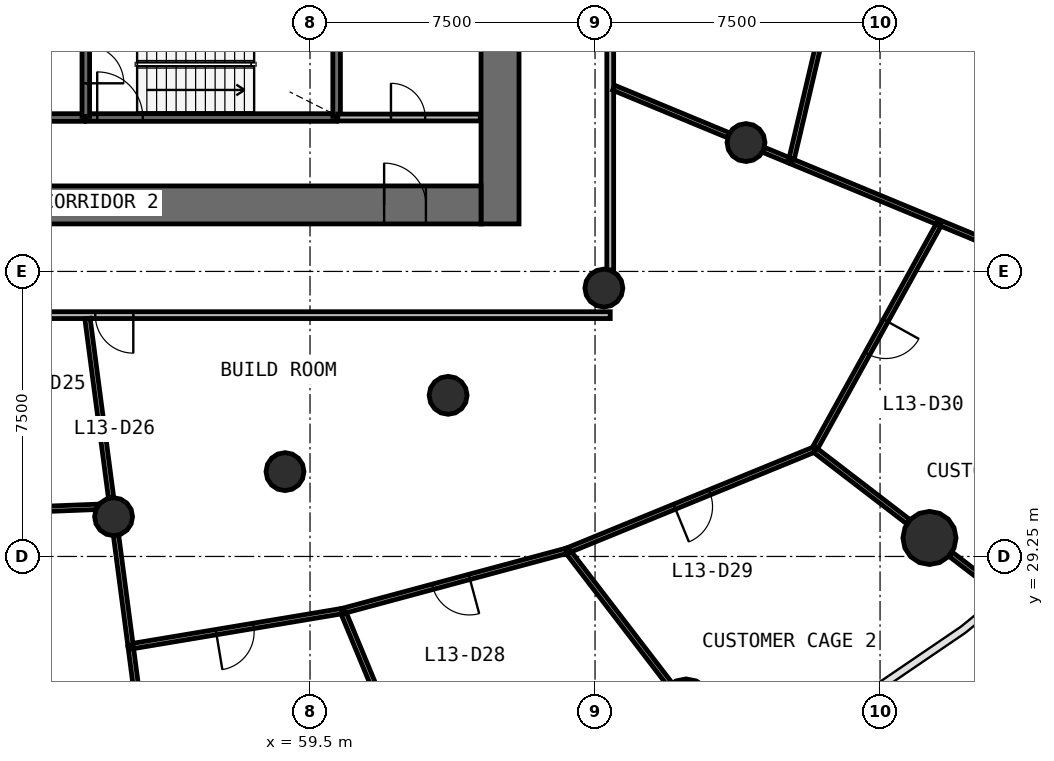
"""IFC4 building model, lengths in metres.
Left out: names, types, materials, properties, quantities, classifications, styles, units other than length and angle.
Written with IfcOpenShell. Run it as: python <this file> out.ifc"""

import sys

from ifc_helpers import new_model, si_unit, direction, frame, frame_2d, origin, origin_2d, place, context, subcontext, project, spatial, rectangle, circle, extrude, source, transform, mapped, element, fill, save


model = new_model("IFC4")
c1 = context("Model", 3, precision=1e-05, world=origin(), true_north=direction((0.0, 1.0)))
c2 = subcontext(c1, "Body", "Model", "MODEL_VIEW")
j1 = project(units=[si_unit("LENGTHUNIT", "METRE"), si_unit("PLANEANGLEUNIT", "RADIAN")], contexts=[c1])
p1 = place(None, origin())
s1 = spatial("IfcSite", under=j1, at=p1, CompositionType="ELEMENT")
p2 = place(p1, origin())
s2 = spatial("IfcBuilding", under=s1, at=p2, CompositionType="ELEMENT")
p3 = place(p2, frame((0.0, 0.0, 57.8)))
s3 = spatial("IfcBuildingStorey", under=s2, at=p3, CompositionType="ELEMENT", Elevation=57.8)
p4 = place(p3, frame((64.5, 38.0, 0.0), z_axis=(0.0, 0.0, 1.0), x_axis=(0.0, 1.0, 0.0)))
e1 = element("IfcWall", 1, at=p4, inside=s3, PredefinedType="SHEAR", context=c2, shape_type="SweptSolid", body=[
    extrude(rectangle(XDim=20.0, YDim=1.0, at=frame_2d((10.0, 0.0))), origin(), (0.0, 0.0, 1.0), 4.4),
])
p5 = place(p4, frame((9.1, 0.0, 0.0)))
e2 = element("IfcOpeningElement", 2, at=p5, cuts=e1, PredefinedType="OPENING", context=c2, shape_type="SweptSolid", body=[
    extrude(rectangle(XDim=1.8, YDim=2.1, at=frame_2d((0.9, 1.05))), frame((0.0, 0.51, 0.0), z_axis=(0.0, -1.0, 0.0), x_axis=(1.0, 0.0, 0.0)), (0.0, 0.0, 1.0), 1.02),
])
p6 = place(p3, frame((40.0, 38.5, 0.0), z_axis=(0.0, 0.0, 1.0), x_axis=(1.0, 0.0, 0.0)))
e3 = element("IfcWall", 3, at=p6, inside=s3, PredefinedType="SHEAR", context=c2, shape_type="SweptSolid", body=[
    extrude(rectangle(XDim=24.0, YDim=1.0, at=frame_2d((12.0, 0.0))), origin(), (0.0, 0.0, 1.0), 4.4),
])
p7 = place(p6, frame((21.45, 0.0, 0.0)))
e4 = element("IfcOpeningElement", 4, at=p7, cuts=e3, PredefinedType="OPENING", context=c2, shape_type="SweptSolid", body=[
    extrude(rectangle(XDim=1.1, YDim=2.1, at=frame_2d((0.55, 1.05))), frame((0.0, 0.51, 0.0), z_axis=(0.0, -1.0, 0.0), x_axis=(1.0, 0.0, 0.0)), (0.0, 0.0, 1.0), 1.02),
])
p8 = place(p6, frame((1.95, 0.0, 0.0)))
e5 = element("IfcOpeningElement", 5, at=p8, cuts=e3, PredefinedType="OPENING", context=c2, shape_type="SweptSolid", body=[
    extrude(rectangle(XDim=1.1, YDim=2.1, at=frame_2d((0.55, 1.05))), frame((0.0, 0.51, 0.0), z_axis=(0.0, -1.0, 0.0), x_axis=(1.0, 0.0, 0.0)), (0.0, 0.0, 1.0), 1.02),
])
m1 = source(origin(), c2, "Body", "SweptSolid", [
    extrude(circle(Radius=0.7, at=origin_2d()), origin(), (0.0, 0.0, 1.0), 4.4),
])
for number, where, z_axis, x_axis in (
    (6, (69.396, 25.328, 0.0), (0.0, 0.0, 1.0), (1.0, 0.0, 0.0)),
    (7, (75.801, 29.737, 0.0), (0.0, 0.0, 1.0), (1.0, 0.0, 0.0)),
):
    element("IfcColumn", number, at=place(p3, frame(where, z_axis=z_axis, x_axis=x_axis)), inside=s3, PredefinedType="COLUMN", context=c2, shape_type="MappedRepresentation", body=[
        mapped(m1, transform((0.0, 0.0, 0.0), scale=1.0)),
    ])
m2 = source(origin(), c2, "Body", "SweptSolid", [
    extrude(circle(Radius=0.5, at=origin_2d()), origin(), (0.0, 0.0, 1.0), 4.4),
])
for number, where, z_axis, x_axis in (
    (8, (54.331, 30.297, 0.0), (0.0, 0.0, 1.0), (1.0, 0.0, 0.0)),
    (9, (58.842, 31.482, 0.0), (0.0, 0.0, 1.0), (1.0, 0.0, 0.0)),
    (10, (63.134, 33.49, 0.0), (0.0, 0.0, 1.0), (1.0, 0.0, 0.0)),
    (11, (67.232, 36.312, 0.0), (0.0, 0.0, 1.0), (1.0, 0.0, 0.0)),
    (12, (70.972, 40.141, 0.0), (0.0, 0.0, 1.0), (1.0, 0.0, 0.0)),
):
    element("IfcColumn", number, at=place(p3, frame(where, z_axis=z_axis, x_axis=x_axis)), inside=s3, PredefinedType="COLUMN", context=c2, shape_type="MappedRepresentation", body=[
        mapped(m2, transform((0.0, 0.0, 0.0), scale=1.0)),
    ])
p9 = place(p3, frame((53.6, 40.8, 0.0), z_axis=(0.0, 0.0, 1.0), x_axis=(1.0, 0.0, 0.0)))
e13 = element("IfcWall", 13, at=p9, inside=s3, PredefinedType="SOLIDWALL", context=c2, shape_type="SweptSolid", body=[
    extrude(rectangle(XDim=6.6, YDim=0.2, at=frame_2d((3.3, 0.0))), origin(), (0.0, 0.0, 1.0), 3.95),
])
p10 = place(p9, frame((0.3, 0.0, 0.0)))
e14 = element("IfcOpeningElement", 14, at=p10, cuts=e13, PredefinedType="OPENING", context=c2, shape_type="SweptSolid", body=[
    extrude(rectangle(XDim=1.2, YDim=2.1, at=frame_2d((0.6, 1.05))), frame((0.0, 0.11, 0.0), z_axis=(0.0, -1.0, 0.0), x_axis=(1.0, 0.0, 0.0)), (0.0, 0.0, 1.0), 0.22),
])
p11 = place(p3, frame((47.9, 40.8, 0.0), z_axis=(0.0, 0.0, 1.0), x_axis=(1.0, 0.0, 0.0)))
e15 = element("IfcWall", 15, at=p11, inside=s3, PredefinedType="SOLIDWALL", context=c2, shape_type="SweptSolid", body=[
    extrude(rectangle(XDim=5.67, YDim=0.2, at=frame_2d((2.835, 0.0))), origin(), (0.0, 0.0, 1.0), 3.95),
])
p12 = place(p11, frame((2.95, 0.0, 0.0)))
e16 = element("IfcOpeningElement", 16, at=p12, cuts=e15, PredefinedType="OPENING", context=c2, shape_type="SweptSolid", body=[
    extrude(rectangle(XDim=1.1, YDim=2.1, at=frame_2d((0.55, 1.05))), frame((0.0, 0.11, 0.0), z_axis=(0.0, -1.0, 0.0), x_axis=(1.0, 0.0, 0.0)), (0.0, 0.0, 1.0), 0.22),
])
p13 = place(p3, frame((60.2, 40.83, 0.0), z_axis=(0.0, 0.0, 1.0), x_axis=(0.0, 1.0, 0.0)))
e17 = element("IfcWall", 17, at=p13, inside=s3, PredefinedType="SOLIDWALL", context=c2, shape_type="SweptSolid", body=[
    extrude(rectangle(XDim=2.77, YDim=0.2, at=frame_2d((1.385, 0.0))), origin(), (0.0, 0.0, 1.0), 3.95),
])
p14 = place(p3, frame((53.6, 43.6, 0.0), z_axis=(0.0, 0.0, 1.0), x_axis=(0.0, -1.0, 0.0)))
e18 = element("IfcWall", 18, at=p14, inside=s3, PredefinedType="SOLIDWALL", context=c2, shape_type="SweptSolid", body=[
    extrude(rectangle(XDim=2.77, YDim=0.2, at=frame_2d((1.385, 0.0))), origin(), (0.0, 0.0, 1.0), 3.95),
])
p15 = place(p14, frame((0.9, 0.0, 0.0)))
e19 = element("IfcOpeningElement", 19, at=p15, cuts=e18, PredefinedType="OPENING", context=c2, shape_type="SweptSolid", body=[
    extrude(rectangle(XDim=1.0, YDim=2.1, at=frame_2d((0.5, 1.05))), frame((0.0, 0.11, 0.0), z_axis=(0.0, -1.0, 0.0), x_axis=(1.0, 0.0, 0.0)), (0.0, 0.0, 1.0), 0.22),
])
p16 = place(p3, frame((67.4, 35.6, 0.0), z_axis=(0.0, 0.0, 1.0), x_axis=(-1.0, 0.0, 0.0)))
e20 = element("IfcWall", 20, at=p16, inside=s3, PredefinedType="PARTITIONING", context=c2, shape_type="SweptSolid", body=[
    extrude(rectangle(XDim=30.8, YDim=0.18, at=frame_2d((15.4, 0.0))), origin(), (0.0, 0.0, 1.0), 3.05),
])
p17 = place(p16, frame((17.25, 0.0, 0.0)))
e21 = element("IfcOpeningElement", 21, at=p17, cuts=e20, PredefinedType="OPENING", context=c2, shape_type="SweptSolid", body=[
    extrude(rectangle(XDim=0.9, YDim=2.1, at=frame_2d((0.45, 1.05))), frame((0.0, 0.1, 0.0), z_axis=(0.0, -1.0, 0.0), x_axis=(1.0, 0.0, 0.0)), (0.0, 0.0, 1.0), 0.2),
])
p18 = place(p16, frame((14.85, 0.0, 0.0)))
e22 = element("IfcOpeningElement", 22, at=p18, cuts=e20, PredefinedType="OPENING", context=c2, shape_type="SweptSolid", body=[
    extrude(rectangle(XDim=0.9, YDim=2.1, at=frame_2d((0.45, 1.05))), frame((0.0, 0.1, 0.0), z_axis=(0.0, -1.0, 0.0), x_axis=(1.0, 0.0, 0.0)), (0.0, 0.0, 1.0), 0.2),
])
p19 = place(p16, frame((12.55, 0.0, 0.0)))
e23 = element("IfcOpeningElement", 23, at=p19, cuts=e20, PredefinedType="OPENING", context=c2, shape_type="SweptSolid", body=[
    extrude(rectangle(XDim=1.0, YDim=2.1, at=frame_2d((0.5, 1.05))), frame((0.0, 0.1, 0.0), z_axis=(0.0, -1.0, 0.0), x_axis=(1.0, 0.0, 0.0)), (0.0, 0.0, 1.0), 0.2),
])
p20 = place(p16, frame((20.95, 0.0, 0.0)))
e24 = element("IfcOpeningElement", 24, at=p20, cuts=e20, PredefinedType="OPENING", context=c2, shape_type="SweptSolid", body=[
    extrude(rectangle(XDim=1.0, YDim=2.1, at=frame_2d((0.5, 1.05))), frame((0.0, 0.1, 0.0), z_axis=(0.0, -1.0, 0.0), x_axis=(1.0, 0.0, 0.0)), (0.0, 0.0, 1.0), 0.2),
])
p21 = place(p3, frame((67.4, 60.37, 0.0), z_axis=(0.0, 0.0, 1.0), x_axis=(0.0, -1.0, 0.0)))
e25 = element("IfcWall", 25, at=p21, inside=s3, PredefinedType="PARTITIONING", context=c2, shape_type="SweptSolid", body=[
    extrude(rectangle(XDim=23.583, YDim=0.18, at=frame_2d((11.791, 0.0))), origin(), (0.0, 0.0, 1.0), 3.05),
])
p22 = place(p21, frame((11.333, 0.0, 0.0)))
e26 = element("IfcOpeningElement", 26, at=p22, cuts=e25, PredefinedType="OPENING", context=c2, shape_type="SweptSolid", body=[
    extrude(rectangle(XDim=1.0, YDim=2.1, at=frame_2d((0.5, 1.05))), frame((0.0, 0.1, 0.0), z_axis=(0.0, -1.0, 0.0), x_axis=(1.0, 0.0, 0.0)), (0.0, 0.0, 1.0), 0.2),
])
p23 = place(p21, frame((4.532, 0.0, 0.0)))
e27 = element("IfcOpeningElement", 27, at=p23, cuts=e25, PredefinedType="OPENING", context=c2, shape_type="SweptSolid", body=[
    extrude(rectangle(XDim=1.0, YDim=2.1, at=frame_2d((0.5, 1.05))), frame((0.0, 0.1, 0.0), z_axis=(0.0, -1.0, 0.0), x_axis=(1.0, 0.0, 0.0)), (0.0, 0.0, 1.0), 0.2),
])
p24 = place(p3, frame((60.23, 40.8, 0.0), z_axis=(0.0, 0.0, 1.0), x_axis=(1.0, 0.0, 0.0)))
e28 = element("IfcWall", 28, at=p24, inside=s3, PredefinedType="PARTITIONING", context=c2, shape_type="SweptSolid", body=[
    extrude(rectangle(XDim=3.75, YDim=0.18, at=frame_2d((1.875, 0.0))), origin(), (0.0, 0.0, 1.0), 3.95),
])
p25 = place(p24, frame((1.4, 0.0, 0.0)))
e29 = element("IfcOpeningElement", 29, at=p25, cuts=e28, PredefinedType="OPENING", context=c2, shape_type="SweptSolid", body=[
    extrude(rectangle(XDim=0.9, YDim=2.1, at=frame_2d((0.45, 1.05))), frame((0.0, 0.1, 0.0), z_axis=(0.0, -1.0, 0.0), x_axis=(1.0, 0.0, 0.0)), (0.0, 0.0, 1.0), 0.2),
])
p26 = place(p3, frame((72.768, 32.064, 0.0), z_axis=(0.0, 0.0, 1.0), x_axis=(-0.925503200364, -0.378739786814, 0.0)))
e30 = element("IfcWall", 30, at=p26, inside=s3, PredefinedType="PARTITIONING", context=c2, shape_type="SweptSolid", body=[
    extrude(rectangle(XDim=7.022, YDim=0.14, at=frame_2d((3.511, 0.0))), origin(), (0.0, 0.0, 1.0), 3.05),
])
p27 = place(p26, frame((2.972, 0.0, 0.0)))
e31 = element("IfcOpeningElement", 31, at=p27, cuts=e30, PredefinedType="OPENING", context=c2, shape_type="SweptSolid", body=[
    extrude(rectangle(XDim=1.0, YDim=2.1, at=frame_2d((0.5, 1.05))), frame((0.0, 0.08, 0.0), z_axis=(0.0, -1.0, 0.0), x_axis=(1.0, 0.0, 0.0)), (0.0, 0.0, 1.0), 0.16),
])
p28 = place(p3, frame((76.071, 38.029, 0.0), z_axis=(0.0, 0.0, 1.0), x_axis=(-0.484378309165, -0.874858647788, 0.0)))
e32 = element("IfcWall", 32, at=p28, inside=s3, PredefinedType="PARTITIONING", context=c2, shape_type="SweptSolid", body=[
    extrude(rectangle(XDim=6.789, YDim=0.14, at=frame_2d((3.395, 0.0))), origin(), (0.0, 0.0, 1.0), 3.05),
])
p29 = place(p28, frame((2.939, 0.0, 0.0)))
e33 = element("IfcOpeningElement", 33, at=p29, cuts=e32, PredefinedType="OPENING", context=c2, shape_type="SweptSolid", body=[
    extrude(rectangle(XDim=1.0, YDim=2.1, at=frame_2d((0.5, 1.05))), frame((0.0, 0.08, 0.0), z_axis=(0.0, -1.0, 0.0), x_axis=(1.0, 0.0, 0.0)), (0.0, 0.0, 1.0), 0.16),
])
p30 = place(p3, frame((66.24, 29.396, 0.0), z_axis=(0.0, 0.0, 1.0), x_axis=(-0.965712487128, -0.259613929145, 0.0)))
e34 = element("IfcWall", 34, at=p30, inside=s3, PredefinedType="PARTITIONING", context=c2, shape_type="SweptSolid", body=[
    extrude(rectangle(XDim=6.088, YDim=0.14, at=frame_2d((3.044, 0.0))), origin(), (0.0, 0.0, 1.0), 3.05),
])
p31 = place(p30, frame((2.638, 0.0, 0.0)))
e35 = element("IfcOpeningElement", 35, at=p31, cuts=e34, PredefinedType="OPENING", context=c2, shape_type="SweptSolid", body=[
    extrude(rectangle(XDim=1.0, YDim=2.1, at=frame_2d((0.5, 1.05))), frame((0.0, 0.08, 0.0), z_axis=(0.0, -1.0, 0.0), x_axis=(1.0, 0.0, 0.0)), (0.0, 0.0, 1.0), 0.16),
])
p32 = place(p3, frame((54.78, 26.883, 0.0), z_axis=(0.0, 0.0, 1.0), x_axis=(0.130539118961, -0.99144315945, 0.0)))
e36 = element("IfcWall", 36, at=p32, inside=s3, PredefinedType="PARTITIONING", context=c2, shape_type="SweptSolid", body=[
    extrude(rectangle(XDim=5.897, YDim=0.14, at=frame_2d((2.948, 0.0))), origin(), (0.0, 0.0, 1.0), 3.05),
])
p33 = place(p3, frame((60.331, 27.811, 0.0), z_axis=(0.0, 0.0, 1.0), x_axis=(-0.986324289368, -0.164816249813, 0.0)))
e37 = element("IfcWall", 37, at=p33, inside=s3, PredefinedType="PARTITIONING", context=c2, shape_type="SweptSolid", body=[
    extrude(rectangle(XDim=5.598, YDim=0.14, at=frame_2d((2.799, 0.0))), origin(), (0.0, 0.0, 1.0), 3.05),
])
p34 = place(p33, frame((2.348, 0.0, 0.0)))
e38 = element("IfcOpeningElement", 38, at=p34, cuts=e37, PredefinedType="OPENING", context=c2, shape_type="SweptSolid", body=[
    extrude(rectangle(XDim=1.0, YDim=2.1, at=frame_2d((0.5, 1.05))), frame((0.0, 0.08, 0.0), z_axis=(0.0, -1.0, 0.0), x_axis=(1.0, 0.0, 0.0)), (0.0, 0.0, 1.0), 0.16),
])
p35 = place(p3, frame((72.158, 39.65, 0.0), z_axis=(0.0, 0.0, 1.0), x_axis=(0.229149871326, 0.973391152863, 0.0)))
e39 = element("IfcWall", 39, at=p35, inside=s3, PredefinedType="PARTITIONING", context=c2, shape_type="SweptSolid", body=[
    extrude(rectangle(XDim=5.417, YDim=0.14, at=frame_2d((2.708, 0.0))), origin(), (0.0, 0.0, 1.0), 3.05),
])
p36 = place(p3, frame((60.387, 27.751, 0.0), z_axis=(0.0, 0.0, 1.0), x_axis=(0.38268597253, -0.923878480337, 0.0)))
e40 = element("IfcWall", 40, at=p36, inside=s3, PredefinedType="PARTITIONING", context=c2, shape_type="SweptSolid", body=[
    extrude(rectangle(XDim=5.312, YDim=0.14, at=frame_2d((2.656, 0.0))), origin(), (0.0, 0.0, 1.0), 3.05),
])
p37 = place(p3, frame((76.099, 38.018, 0.0), z_axis=(0.0, 0.0, 1.0), x_axis=(0.923875284448, -0.382693687936, 0.0)))
e41 = element("IfcWall", 41, at=p37, inside=s3, PredefinedType="PARTITIONING", context=c2, shape_type="SweptSolid", body=[
    extrude(rectangle(XDim=5.298, YDim=0.14, at=frame_2d((2.649, 0.0))), origin(), (0.0, 0.0, 1.0), 3.05),
])
p38 = place(p3, frame((53.644, 35.51, 0.0), z_axis=(0.0, 0.0, 1.0), x_axis=(0.130548834981, -0.991441880135, 0.0)))
e42 = element("IfcWall", 42, at=p38, inside=s3, PredefinedType="PARTITIONING", context=c2, shape_type="SweptSolid", body=[
    extrude(rectangle(XDim=4.754, YDim=0.14, at=frame_2d((2.377, 0.0))), origin(), (0.0, 0.0, 1.0), 3.05),
])
p39 = place(p3, frame((66.313, 29.347, 0.0), z_axis=(0.0, 0.0, 1.0), x_axis=(0.608768802399, -0.793347682435, 0.0)))
e43 = element("IfcWall", 43, at=p39, inside=s3, PredefinedType="PARTITIONING", context=c2, shape_type="SweptSolid", body=[
    extrude(rectangle(XDim=4.361, YDim=0.14, at=frame_2d((2.18, 0.0))), origin(), (0.0, 0.0, 1.0), 3.05),
])
p40 = place(p3, frame((72.186, 39.639, 0.0), z_axis=(0.0, 0.0, 1.0), x_axis=(0.923883699466, -0.382673372291, 0.0)))
e44 = element("IfcWall", 44, at=p40, inside=s3, PredefinedType="PARTITIONING", context=c2, shape_type="SweptSolid", body=[
    extrude(rectangle(XDim=4.135, YDim=0.14, at=frame_2d((2.067, 0.0))), origin(), (0.0, 0.0, 1.0), 3.05),
])
p41 = place(p3, frame((50.134, 30.407, 0.0), z_axis=(0.0, 0.0, 1.0), x_axis=(0.999223066678, 0.039411457966, 0.0)))
e45 = element("IfcWall", 45, at=p41, inside=s3, PredefinedType="PARTITIONING", context=c2, shape_type="SweptSolid", body=[
    extrude(rectangle(XDim=3.766, YDim=0.14, at=frame_2d((1.883, 0.0))), origin(), (0.0, 0.0, 1.0), 3.05),
])
p42 = place(p3, frame((67.49, 41.584, 0.0), z_axis=(0.0, 0.0, 1.0), x_axis=(0.923911109142, -0.382607190737, 0.0)))
e46 = element("IfcWall", 46, at=p42, inside=s3, PredefinedType="PARTITIONING", context=c2, shape_type="SweptSolid", body=[
    extrude(rectangle(XDim=3.264, YDim=0.14, at=frame_2d((1.632, 0.0))), origin(), (0.0, 0.0, 1.0), 3.05),
])
p43 = place(p3, frame((72.792, 32.046, 0.0), z_axis=(0.0, 0.0, 1.0), x_axis=(0.793358163661, -0.608755143019, 0.0)))
e47 = element("IfcWall", 47, at=p43, inside=s3, PredefinedType="PARTITIONING", context=c2, shape_type="SweptSolid", body=[
    extrude(rectangle(XDim=3.088, YDim=0.14, at=frame_2d((1.544, 0.0))), origin(), (0.0, 0.0, 1.0), 3.05),
])
p44 = place(p3, frame((54.396, 29.797, 0.0), z_axis=(0.0, 0.0, 1.0), x_axis=(0.130530511821, -0.991444292678, 0.0)))
e48 = element("IfcWall", 48, at=p44, inside=s3, PredefinedType="PARTITIONING", context=c2, shape_type="SweptSolid", body=[
    extrude(rectangle(XDim=2.908, YDim=0.14, at=frame_2d((1.454, 0.0))), origin(), (0.0, 0.0, 1.0), 3.05),
])
p45 = place(p3, frame((76.359, 29.309, 0.0), z_axis=(0.0, 0.0, 1.0), x_axis=(0.793288592826, -0.608845800258, 0.0)))
e49 = element("IfcWall", 49, at=p45, inside=s3, PredefinedType="PARTITIONING", context=c2, shape_type="SweptSolid", body=[
    extrude(rectangle(XDim=1.719, YDim=0.14, at=frame_2d((0.86, 0.0))), origin(), (0.0, 0.0, 1.0), 3.05),
])
p46 = place(p3, frame((71.439, 39.948, 0.0), z_axis=(0.0, 0.0, 1.0), x_axis=(0.92386119338, -0.382727703944, 0.0)))
e50 = element("IfcWall", 50, at=p46, inside=s3, PredefinedType="PARTITIONING", context=c2, shape_type="SweptSolid", body=[
    extrude(rectangle(XDim=0.708, YDim=0.14, at=frame_2d((0.354, 0.0))), origin(), (0.0, 0.0, 1.0), 3.05),
])
m3 = source(origin(), c2, "Body", "SweptSolid", [
    extrude(rectangle(XDim=1.2, YDim=2.1, at=frame_2d((0.6, 1.05))), frame((0.0, 0.025, 0.0), z_axis=(0.0, -1.0, 0.0), x_axis=(1.0, 0.0, 0.0)), (0.0, 0.0, 1.0), 0.05),
])
p47 = place(p10, origin())
e51 = element("IfcDoor", 51, at=p47, inside=s3, OperationType="SINGLE_SWING_LEFT", PredefinedType="DOOR", context=c2, shape_type="MappedRepresentation", body=[
    mapped(m3, transform((0.0, 0.0, 0.0), scale=1.0)),
])
fill(e14, e51)
m4 = source(origin(), c2, "Body", "SweptSolid", [
    extrude(rectangle(XDim=1.0, YDim=2.1, at=frame_2d((0.5, 1.05))), frame((0.0, 0.025, 0.0), z_axis=(0.0, -1.0, 0.0), x_axis=(1.0, 0.0, 0.0)), (0.0, 0.0, 1.0), 0.05),
])
p48 = place(p15, origin())
e52 = element("IfcDoor", 52, at=p48, inside=s3, OperationType="SINGLE_SWING_RIGHT", PredefinedType="DOOR", context=c2, shape_type="MappedRepresentation", body=[
    mapped(m4, transform((0.0, 0.0, 0.0), scale=1.0)),
])
fill(e19, e52)
m5 = source(origin(), c2, "Body", "SweptSolid", [
    extrude(rectangle(XDim=1.1, YDim=2.1, at=frame_2d((0.55, 1.05))), frame((0.0, 0.025, 0.0), z_axis=(0.0, -1.0, 0.0), x_axis=(1.0, 0.0, 0.0)), (0.0, 0.0, 1.0), 0.05),
])
p49 = place(p7, origin())
e53 = element("IfcDoor", 53, at=p49, inside=s3, OperationType="SINGLE_SWING_LEFT", PredefinedType="DOOR", context=c2, shape_type="MappedRepresentation", body=[
    mapped(m5, transform((0.0, 0.0, 0.0), scale=1.0)),
])
fill(e4, e53)
m6 = source(origin(), c2, "Body", "SweptSolid", [
    extrude(rectangle(XDim=1.0, YDim=2.1, at=frame_2d((0.5, 1.05))), frame((0.0, 0.025, 0.0), z_axis=(0.0, -1.0, 0.0), x_axis=(1.0, 0.0, 0.0)), (0.0, 0.0, 1.0), 0.05),
])
p50 = place(p19, origin())
e54 = element("IfcDoor", 54, at=p50, inside=s3, OperationType="SINGLE_SWING_LEFT", PredefinedType="DOOR", context=c2, shape_type="MappedRepresentation", body=[
    mapped(m6, transform((0.0, 0.0, 0.0), scale=1.0)),
])
fill(e23, e54)
p51 = place(p34, origin())
e55 = element("IfcDoor", 55, at=p51, inside=s3, OperationType="SINGLE_SWING_RIGHT", PredefinedType="DOOR", context=c2, shape_type="MappedRepresentation", body=[
    mapped(m6, transform((0.0, 0.0, 0.0), scale=1.0)),
])
fill(e38, e55)
p52 = place(p31, origin())
e56 = element("IfcDoor", 56, at=p52, inside=s3, OperationType="SINGLE_SWING_LEFT", PredefinedType="DOOR", context=c2, shape_type="MappedRepresentation", body=[
    mapped(m6, transform((0.0, 0.0, 0.0), scale=1.0)),
])
fill(e35, e56)
p53 = place(p27, origin())
e57 = element("IfcDoor", 57, at=p53, inside=s3, OperationType="SINGLE_SWING_RIGHT", PredefinedType="DOOR", context=c2, shape_type="MappedRepresentation", body=[
    mapped(m6, transform((0.0, 0.0, 0.0), scale=1.0)),
])
fill(e31, e57)
p54 = place(p29, origin())
e58 = element("IfcDoor", 58, at=p54, inside=s3, OperationType="SINGLE_SWING_LEFT", PredefinedType="DOOR", context=c2, shape_type="MappedRepresentation", body=[
    mapped(m6, transform((0.0, 0.0, 0.0), scale=1.0)),
])
fill(e33, e58)
m7 = source(origin(), c2, "Body", "SweptSolid", [
    extrude(rectangle(XDim=0.9, YDim=2.1, at=frame_2d((0.45, 1.05))), frame((0.0, 0.025, 0.0), z_axis=(0.0, -1.0, 0.0), x_axis=(1.0, 0.0, 0.0)), (0.0, 0.0, 1.0), 0.05),
])
p55 = place(p25, origin())
e59 = element("IfcDoor", 59, at=p55, inside=s3, OperationType="SINGLE_SWING_LEFT", PredefinedType="DOOR", context=c2, shape_type="MappedRepresentation", body=[
    mapped(m7, transform((0.0, 0.0, 0.0), scale=1.0)),
])
fill(e29, e59)
save(model, sys.argv[1])
